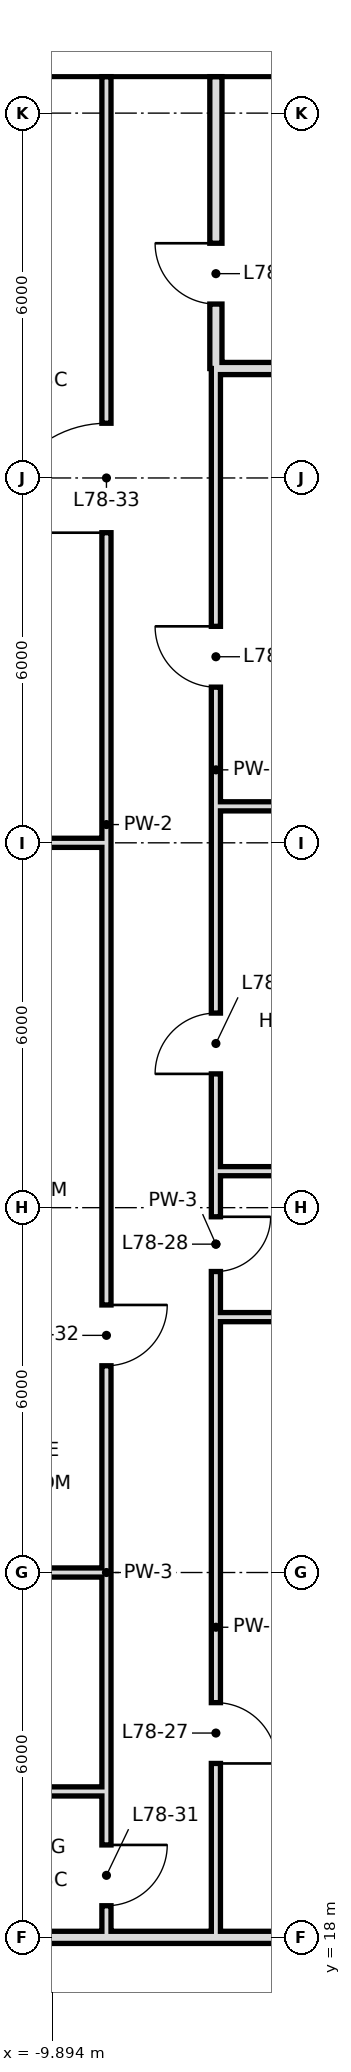
"""IFC4 building model, lengths in metres.
Left out: names, types, materials, properties, quantities, classifications, styles, units other than length and angle.
Written with IfcOpenShell. Run it as: python <this file> out.ifc"""

import sys

from ifc_helpers import new_model, si_unit, direction, frame, frame_2d, origin, place, context, subcontext, project, spatial, rectangle, extrude, element, fill, save


model = new_model("IFC4")
c1 = context("Model", 3, precision=1e-05, world=origin(), true_north=direction((0.0, 1.0)))
c2 = subcontext(c1, "Body", "Model", "MODEL_VIEW")
j1 = project(units=[si_unit("LENGTHUNIT", "METRE"), si_unit("PLANEANGLEUNIT", "RADIAN")], contexts=[c1])
p1 = place(None, origin())
s1 = spatial("IfcSite", under=j1, at=p1, CompositionType="ELEMENT")
p2 = place(p1, origin())
s2 = spatial("IfcBuilding", under=s1, at=p2, CompositionType="ELEMENT")
p3 = place(p2, frame((0.0, 0.0, 326.8)))
s3 = spatial("IfcBuildingStorey", under=s2, at=p3, CompositionType="ELEMENT", Elevation=326.8)
p4 = place(p3, frame((-7.2, 43.8, 0.0), z_axis=(0.0, 0.0, 1.0), x_axis=(0.0, 1.0, 0.0)))
e1 = element("IfcWall", 1, at=p4, inside=s3, PredefinedType="SOLIDWALL", context=c2, shape_type="SweptSolid", body=[
    extrude(rectangle(XDim=4.8, YDim=0.2, at=frame_2d((2.4, 0.0))), origin(), (0.0, 0.0, 1.0), 3.4),
])
p5 = place(p4, frame((1.06, 0.0, 0.0)))
e2 = element("IfcOpeningElement", 2, at=p5, cuts=e1, PredefinedType="OPENING", context=c2, shape_type="SweptSolid", body=[
    extrude(rectangle(XDim=1.0, YDim=2.4, at=frame_2d((0.5, 1.2))), frame((0.0, 0.11, 0.0), z_axis=(0.0, -1.0, 0.0), x_axis=(1.0, 0.0, 0.0)), (0.0, 0.0, 1.0), 0.22),
])
p6 = place(p3, frame((-7.2, 18.0, 0.0), z_axis=(0.0, 0.0, 1.0), x_axis=(0.0, 1.0, 0.0)))
e3 = element("IfcWall", 3, at=p6, inside=s3, PredefinedType="PARTITIONING", context=c2, shape_type="SweptSolid", body=[
    extrude(rectangle(XDim=10.2, YDim=0.15, at=frame_2d((5.1, 0.0))), origin(), (0.0, 0.0, 1.0), 4.1),
])
p7 = place(p6, frame((2.86, 0.0, 0.0)))
e4 = element("IfcOpeningElement", 4, at=p7, cuts=e3, PredefinedType="OPENING", context=c2, shape_type="SweptSolid", body=[
    extrude(rectangle(XDim=1.0, YDim=2.4, at=frame_2d((0.5, 1.2))), frame((0.0, 0.085, 0.0), z_axis=(0.0, -1.0, 0.0), x_axis=(1.0, 0.0, 0.0)), (0.0, 0.0, 1.0), 0.17),
])
p8 = place(p3, frame((-7.2, 30.6, 0.0), z_axis=(0.0, 0.0, 1.0), x_axis=(0.0, 1.0, 0.0)))
e5 = element("IfcWall", 5, at=p8, inside=s3, PredefinedType="PARTITIONING", context=c2, shape_type="SweptSolid", body=[
    extrude(rectangle(XDim=13.2, YDim=0.15, at=frame_2d((6.6, 0.0))), origin(), (0.0, 0.0, 1.0), 4.1),
])
p9 = place(p8, frame((1.6, 0.0, 0.0)))
e6 = element("IfcOpeningElement", 6, at=p9, cuts=e5, PredefinedType="OPENING", context=c2, shape_type="SweptSolid", body=[
    extrude(rectangle(XDim=1.0, YDim=2.4, at=frame_2d((0.5, 1.2))), frame((0.0, 0.085, 0.0), z_axis=(0.0, -1.0, 0.0), x_axis=(1.0, 0.0, 0.0)), (0.0, 0.0, 1.0), 0.17),
])
p10 = place(p8, frame((7.96, 0.0, 0.0)))
e7 = element("IfcOpeningElement", 7, at=p10, cuts=e5, PredefinedType="OPENING", context=c2, shape_type="SweptSolid", body=[
    extrude(rectangle(XDim=1.0, YDim=2.4, at=frame_2d((0.5, 1.2))), frame((0.0, 0.085, 0.0), z_axis=(0.0, -1.0, 0.0), x_axis=(1.0, 0.0, 0.0)), (0.0, 0.0, 1.0), 0.17),
])
p11 = place(p3, frame((-7.2, 28.2, 0.0), z_axis=(0.0, 0.0, 1.0), x_axis=(0.0, 1.0, 0.0)))
e8 = element("IfcWall", 8, at=p11, inside=s3, PredefinedType="PARTITIONING", context=c2, shape_type="SweptSolid", body=[
    extrude(rectangle(XDim=2.4, YDim=0.15, at=frame_2d((1.2, 0.0))), origin(), (0.0, 0.0, 1.0), 4.1),
])
p12 = place(p11, frame((0.75, 0.0, 0.0)))
e9 = element("IfcOpeningElement", 9, at=p12, cuts=e8, PredefinedType="OPENING", context=c2, shape_type="SweptSolid", body=[
    extrude(rectangle(XDim=0.9, YDim=2.4, at=frame_2d((0.45, 1.2))), frame((0.0, 0.085, 0.0), z_axis=(0.0, -1.0, 0.0), x_axis=(1.0, 0.0, 0.0)), (0.0, 0.0, 1.0), 0.17),
])
p13 = place(p3, frame((-9.0, 18.0, 0.0), z_axis=(0.0, 0.0, 1.0), x_axis=(0.0, 1.0, 0.0)))
e10 = element("IfcWall", 10, at=p13, inside=s3, PredefinedType="PARTITIONING", context=c2, shape_type="SweptSolid", body=[
    extrude(rectangle(XDim=2.4, YDim=0.15, at=frame_2d((1.2, 0.0))), origin(), (0.0, 0.0, 1.0), 4.1),
])
p14 = place(p13, frame((0.52, 0.0, 0.0)))
e11 = element("IfcOpeningElement", 11, at=p14, cuts=e10, PredefinedType="OPENING", context=c2, shape_type="SweptSolid", body=[
    extrude(rectangle(XDim=1.0, YDim=2.4, at=frame_2d((0.5, 1.2))), frame((0.0, 0.085, 0.0), z_axis=(0.0, -1.0, 0.0), x_axis=(1.0, 0.0, 0.0)), (0.0, 0.0, 1.0), 0.17),
])
p15 = place(p3, frame((-9.0, 24.0, 0.0), z_axis=(0.0, 0.0, 1.0), x_axis=(0.0, 1.0, 0.0)))
e12 = element("IfcWall", 12, at=p15, inside=s3, PredefinedType="PARTITIONING", context=c2, shape_type="SweptSolid", body=[
    extrude(rectangle(XDim=24.6, YDim=0.15, at=frame_2d((12.3, 0.0))), origin(), (0.0, 0.0, 1.0), 4.1),
])
p16 = place(p15, frame((3.4, 0.0, 0.0)))
e13 = element("IfcOpeningElement", 13, at=p16, cuts=e12, PredefinedType="OPENING", context=c2, shape_type="SweptSolid", body=[
    extrude(rectangle(XDim=1.0, YDim=2.4, at=frame_2d((0.5, 1.2))), frame((0.0, 0.085, 0.0), z_axis=(0.0, -1.0, 0.0), x_axis=(1.0, 0.0, 0.0)), (0.0, 0.0, 1.0), 0.17),
])
p17 = place(p15, frame((17.1, 0.0, 0.0)))
e14 = element("IfcOpeningElement", 14, at=p17, cuts=e12, PredefinedType="OPENING", context=c2, shape_type="SweptSolid", body=[
    extrude(rectangle(XDim=1.8, YDim=2.4, at=frame_2d((0.9, 1.2))), frame((0.0, 0.085, 0.0), z_axis=(0.0, -1.0, 0.0), x_axis=(1.0, 0.0, 0.0)), (0.0, 0.0, 1.0), 0.17),
])
p18 = place(p3, frame((-9.0, 20.4, 0.0), z_axis=(0.0, 0.0, 1.0), x_axis=(0.0, 1.0, 0.0)))
e15 = element("IfcWall", 15, at=p18, inside=s3, PredefinedType="PARTITIONING", context=c2, shape_type="SweptSolid", body=[
    extrude(rectangle(XDim=3.6, YDim=0.15, at=frame_2d((1.8, 0.0))), origin(), (0.0, 0.0, 1.0), 4.1),
])
p19 = place(p3, frame((-18.6, 18.0, 0.0), z_axis=(0.0, 0.0, 1.0), x_axis=(1.0, 0.0, 0.0)))
e16 = element("IfcWall", 16, at=p19, inside=s3, PredefinedType="SOLIDWALL", context=c2, shape_type="SweptSolid", body=[
    extrude(rectangle(XDim=15.0, YDim=0.2, at=frame_2d((7.5, 0.0))), origin(), (0.0, 0.0, 1.0), 3.4),
])
p20 = place(p3, frame((-12.0, 20.4, 0.0), z_axis=(0.0, 0.0, 1.0), x_axis=(1.0, 0.0, 0.0)))
e17 = element("IfcWall", 17, at=p20, inside=s3, PredefinedType="PARTITIONING", context=c2, shape_type="SweptSolid", body=[
    extrude(rectangle(XDim=3.0, YDim=0.15, at=frame_2d((1.5, 0.0))), origin(), (0.0, 0.0, 1.0), 4.1),
])
p21 = place(p3, frame((-12.0, 24.0, 0.0), z_axis=(0.0, 0.0, 1.0), x_axis=(1.0, 0.0, 0.0)))
e18 = element("IfcWall", 18, at=p21, inside=s3, PredefinedType="PARTITIONING", context=c2, shape_type="SweptSolid", body=[
    extrude(rectangle(XDim=3.0, YDim=0.15, at=frame_2d((1.5, 0.0))), origin(), (0.0, 0.0, 1.0), 3.4),
])
for number, where, z_axis, x_axis in (
    (19, (-7.2, 28.2, 0.0), (0.0, 0.0, 1.0), (1.0, 0.0, 0.0)),
    (20, (-7.2, 30.6, 0.0), (0.0, 0.0, 1.0), (1.0, 0.0, 0.0)),
):
    element("IfcWall", number, at=place(p3, frame(where, z_axis=z_axis, x_axis=x_axis)), inside=s3, PredefinedType="PARTITIONING", context=c2, shape_type="SweptSolid", body=[
        extrude(rectangle(XDim=10.3, YDim=0.15, at=frame_2d((5.15, 0.0))), origin(), (0.0, 0.0, 1.0), 4.1),
    ])
p22 = place(p3, frame((-18.0, 36.0, 0.0), z_axis=(0.0, 0.0, 1.0), x_axis=(1.0, 0.0, 0.0)))
e21 = element("IfcWall", 21, at=p22, inside=s3, PredefinedType="PARTITIONING", context=c2, shape_type="SweptSolid", body=[
    extrude(rectangle(XDim=9.0, YDim=0.15, at=frame_2d((4.5, 0.0))), origin(), (0.0, 0.0, 1.0), 3.4),
])
p23 = place(p3, frame((-7.2, 36.6, 0.0), z_axis=(0.0, 0.0, 1.0), x_axis=(1.0, 0.0, 0.0)))
e22 = element("IfcWall", 22, at=p23, inside=s3, PredefinedType="PARTITIONING", context=c2, shape_type="SweptSolid", body=[
    extrude(rectangle(XDim=10.3, YDim=0.15, at=frame_2d((5.15, 0.0))), origin(), (0.0, 0.0, 1.0), 4.1),
])
p24 = place(p3, frame((-7.2, 43.8, 0.0), z_axis=(0.0, 0.0, 1.0), x_axis=(1.0, 0.0, 0.0)))
e23 = element("IfcWall", 23, at=p24, inside=s3, PredefinedType="SOLIDWALL", context=c2, shape_type="SweptSolid", body=[
    extrude(rectangle(XDim=10.3, YDim=0.2, at=frame_2d((5.15, 0.0))), origin(), (0.0, 0.0, 1.0), 3.4),
])
p25 = place(p9, origin())
e24 = element("IfcDoor", 24, at=p25, inside=s3, OperationType="SINGLE_SWING_LEFT", PredefinedType="DOOR", context=c2, shape_type="SweptSolid", body=[
    extrude(rectangle(XDim=1.0, YDim=2.4, at=frame_2d((0.5, 1.2))), frame((0.0, 0.025, 0.0), z_axis=(0.0, -1.0, 0.0), x_axis=(1.0, 0.0, 0.0)), (0.0, 0.0, 1.0), 0.05),
])
fill(e6, e24)
p26 = place(p7, frame((1.0, 0.0, 0.0), z_axis=(0.0, 0.0, 1.0), x_axis=(-1.0, 0.0, 0.0)))
e25 = element("IfcDoor", 25, at=p26, inside=s3, OperationType="SINGLE_SWING_RIGHT", PredefinedType="DOOR", context=c2, shape_type="SweptSolid", body=[
    extrude(rectangle(XDim=1.0, YDim=2.4, at=frame_2d((0.5, 1.2))), frame((0.0, 0.025, 0.0), z_axis=(0.0, -1.0, 0.0), x_axis=(1.0, 0.0, 0.0)), (0.0, 0.0, 1.0), 0.05),
])
fill(e4, e25)
p27 = place(p12, origin())
e26 = element("IfcDoor", 26, at=p27, inside=s3, OperationType="SINGLE_SWING_RIGHT", PredefinedType="DOOR", context=c2, shape_type="SweptSolid", body=[
    extrude(rectangle(XDim=0.9, YDim=2.4, at=frame_2d((0.45, 1.2))), frame((0.0, 0.025, 0.0), z_axis=(0.0, -1.0, 0.0), x_axis=(1.0, 0.0, 0.0)), (0.0, 0.0, 1.0), 0.05),
])
fill(e9, e26)
p28 = place(p10, frame((1.0, 0.0, 0.0), z_axis=(0.0, 0.0, 1.0), x_axis=(-1.0, 0.0, 0.0)))
e27 = element("IfcDoor", 27, at=p28, inside=s3, OperationType="SINGLE_SWING_LEFT", PredefinedType="DOOR", context=c2, shape_type="SweptSolid", body=[
    extrude(rectangle(XDim=1.0, YDim=2.4, at=frame_2d((0.5, 1.2))), frame((0.0, 0.025, 0.0), z_axis=(0.0, -1.0, 0.0), x_axis=(1.0, 0.0, 0.0)), (0.0, 0.0, 1.0), 0.05),
])
fill(e7, e27)
p29 = place(p5, frame((1.0, 0.0, 0.0), z_axis=(0.0, 0.0, 1.0), x_axis=(-1.0, 0.0, 0.0)))
e28 = element("IfcDoor", 28, at=p29, inside=s3, OperationType="SINGLE_SWING_LEFT", PredefinedType="DOOR", context=c2, shape_type="SweptSolid", body=[
    extrude(rectangle(XDim=1.0, YDim=2.4, at=frame_2d((0.5, 1.2))), frame((0.0, 0.025, 0.0), z_axis=(0.0, -1.0, 0.0), x_axis=(1.0, 0.0, 0.0)), (0.0, 0.0, 1.0), 0.05),
])
fill(e2, e28)
p30 = place(p14, origin())
e29 = element("IfcDoor", 29, at=p30, inside=s3, OperationType="SINGLE_SWING_RIGHT", PredefinedType="DOOR", context=c2, shape_type="SweptSolid", body=[
    extrude(rectangle(XDim=1.0, YDim=2.4, at=frame_2d((0.5, 1.2))), frame((0.0, 0.025, 0.0), z_axis=(0.0, -1.0, 0.0), x_axis=(1.0, 0.0, 0.0)), (0.0, 0.0, 1.0), 0.05),
])
fill(e11, e29)
p31 = place(p16, origin())
e30 = element("IfcDoor", 30, at=p31, inside=s3, OperationType="SINGLE_SWING_RIGHT", PredefinedType="DOOR", context=c2, shape_type="SweptSolid", body=[
    extrude(rectangle(XDim=1.0, YDim=2.4, at=frame_2d((0.5, 1.2))), frame((0.0, 0.025, 0.0), z_axis=(0.0, -1.0, 0.0), x_axis=(1.0, 0.0, 0.0)), (0.0, 0.0, 1.0), 0.05),
])
fill(e13, e30)
p32 = place(p17, origin())
e31 = element("IfcDoor", 31, at=p32, inside=s3, OperationType="SINGLE_SWING_LEFT", PredefinedType="DOOR", context=c2, shape_type="SweptSolid", body=[
    extrude(rectangle(XDim=1.8, YDim=2.4, at=frame_2d((0.9, 1.2))), frame((0.0, 0.025, 0.0), z_axis=(0.0, -1.0, 0.0), x_axis=(1.0, 0.0, 0.0)), (0.0, 0.0, 1.0), 0.05),
])
fill(e14, e31)
save(model, sys.argv[1])
